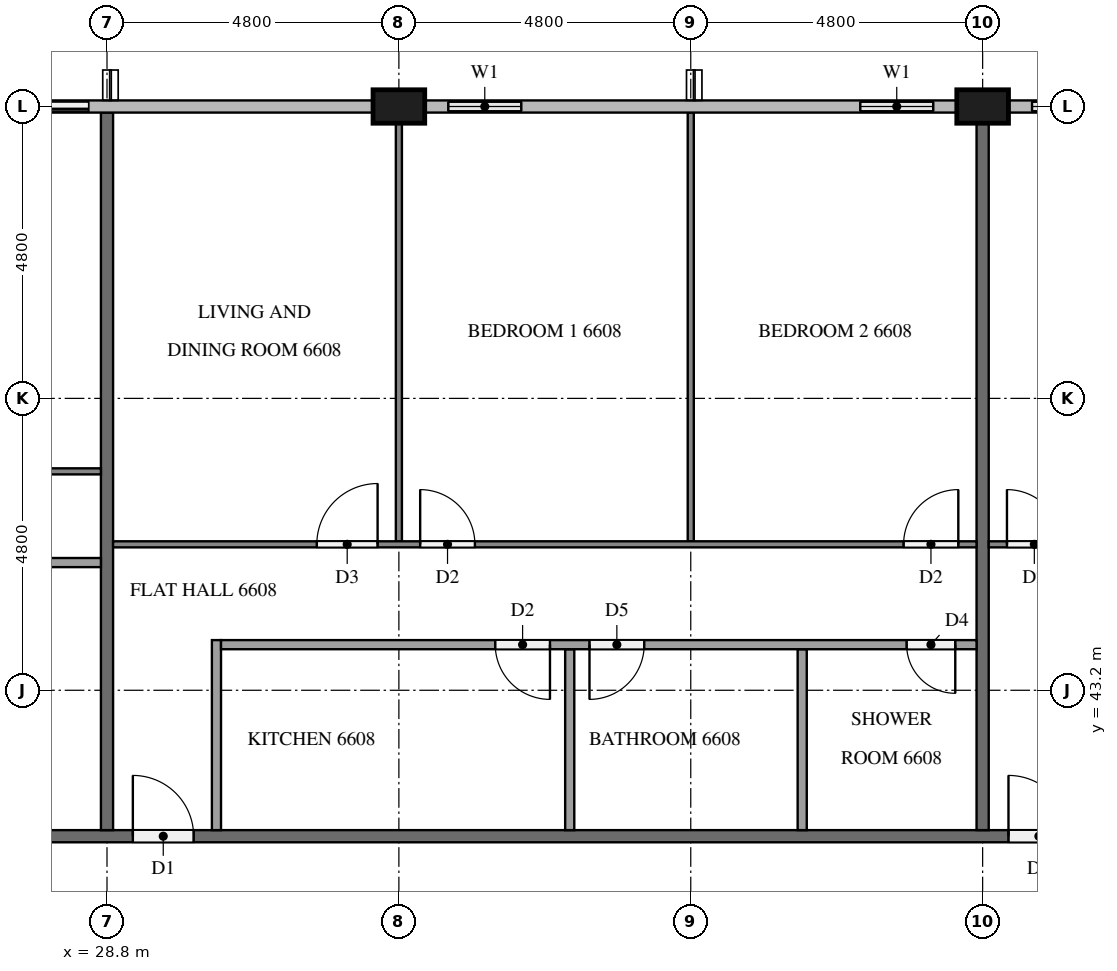
"""IFC4 building model, lengths in metres.
Left out: names, types, materials, properties, quantities, classifications, styles, units other than length and angle.
Written with IfcOpenShell. Run it as: python <this file> out.ifc"""

import sys

from ifc_helpers import new_model, si_unit, direction, frame, frame_2d, origin, origin_2d, place, context, subcontext, project, spatial, rectangle, extrude, element, fill, save


model = new_model("IFC4")
c1 = context("Model", 3, precision=1e-05, world=origin(), true_north=direction((0.0, 1.0)))
c2 = subcontext(c1, "Body", "Model", "MODEL_VIEW")
j1 = project(units=[si_unit("LENGTHUNIT", "METRE"), si_unit("PLANEANGLEUNIT", "RADIAN")], contexts=[c1])
p1 = place(None, origin())
s1 = spatial("IfcSite", under=j1, at=p1, CompositionType="ELEMENT")
p2 = place(p1, origin())
s2 = spatial("IfcBuilding", under=s1, at=p2, CompositionType="ELEMENT")
p3 = place(p2, frame((0.0, 0.0, 252.7)))
s3 = spatial("IfcBuildingStorey", under=s2, at=p3, CompositionType="ELEMENT", Elevation=252.7)
for number, where, z_axis, x_axis in (
    (1, (43.2, 52.8, 0.0), (0.0, 0.0, 1.0), (1.0, 0.0, 0.0)),
    (2, (33.6, 52.8, 0.0), (0.0, 0.0, 1.0), (1.0, 0.0, 0.0)),
):
    element("IfcColumn", number, at=place(p3, frame(where, z_axis=z_axis, x_axis=x_axis)), inside=s3, PredefinedType="COLUMN", context=c2, shape_type="SweptSolid", body=[
        extrude(rectangle(XDim=0.85, YDim=0.55, at=origin_2d()), origin(), (0.0, 0.0, 1.0), 3.2),
    ])
p4 = place(p3, frame((45.6, 52.8, 0.0), z_axis=(0.0, 0.0, 1.0), x_axis=(-1.0, 0.0, 0.0)))
e3 = element("IfcWall", 3, at=p4, inside=s3, PredefinedType="SOLIDWALL", context=c2, shape_type="SweptSolid", body=[
    extrude(rectangle(XDim=1.975, YDim=0.15, at=frame_2d((0.988, 0.0))), origin(), (0.0, 0.0, 1.0), 3.2),
])
p5 = place(p4, frame((0.387, 0.0, 0.9)))
e4 = element("IfcOpeningElement", 4, at=p5, cuts=e3, PredefinedType="OPENING", context=c2, shape_type="SweptSolid", body=[
    extrude(rectangle(XDim=1.2, YDim=1.4, at=frame_2d((0.6, 0.7))), frame((0.0, 0.085, 0.0), z_axis=(0.0, -1.0, 0.0), x_axis=(1.0, 0.0, 0.0)), (0.0, 0.0, 1.0), 0.17),
])
p6 = place(p3, frame((42.775, 52.8, 0.0), z_axis=(0.0, 0.0, 1.0), x_axis=(-1.0, 0.0, 0.0)))
e5 = element("IfcWall", 5, at=p6, inside=s3, PredefinedType="SOLIDWALL", context=c2, shape_type="SweptSolid", body=[
    extrude(rectangle(XDim=1.975, YDim=0.15, at=frame_2d((0.987, 0.0))), origin(), (0.0, 0.0, 1.0), 3.2),
])
p7 = place(p6, frame((0.387, 0.0, 0.9)))
e6 = element("IfcOpeningElement", 6, at=p7, cuts=e5, PredefinedType="OPENING", context=c2, shape_type="SweptSolid", body=[
    extrude(rectangle(XDim=1.2, YDim=1.4, at=frame_2d((0.6, 0.7))), frame((0.0, 0.085, 0.0), z_axis=(0.0, -1.0, 0.0), x_axis=(1.0, 0.0, 0.0)), (0.0, 0.0, 1.0), 0.17),
])
p8 = place(p3, frame((36.0, 52.8, 0.0), z_axis=(0.0, 0.0, 1.0), x_axis=(-1.0, 0.0, 0.0)))
e7 = element("IfcWall", 7, at=p8, inside=s3, PredefinedType="SOLIDWALL", context=c2, shape_type="SweptSolid", body=[
    extrude(rectangle(XDim=1.975, YDim=0.15, at=frame_2d((0.988, 0.0))), origin(), (0.0, 0.0, 1.0), 3.2),
])
p9 = place(p8, frame((0.387, 0.0, 0.9)))
e8 = element("IfcOpeningElement", 8, at=p9, cuts=e7, PredefinedType="OPENING", context=c2, shape_type="SweptSolid", body=[
    extrude(rectangle(XDim=1.2, YDim=1.4, at=frame_2d((0.6, 0.7))), frame((0.0, 0.085, 0.0), z_axis=(0.0, -1.0, 0.0), x_axis=(1.0, 0.0, 0.0)), (0.0, 0.0, 1.0), 0.17),
])
p10 = place(p3, frame((28.8, 52.8, 0.0), z_axis=(0.0, 0.0, 1.0), x_axis=(-1.0, 0.0, 0.0)))
e9 = element("IfcWall", 9, at=p10, inside=s3, PredefinedType="SOLIDWALL", context=c2, shape_type="SweptSolid", body=[
    extrude(rectangle(XDim=2.4, YDim=0.15, at=frame_2d((1.2, 0.0))), origin(), (0.0, 0.0, 1.0), 3.2),
])
p11 = place(p10, frame((0.3, 0.0, 0.0)))
e10 = element("IfcOpeningElement", 10, at=p11, cuts=e9, PredefinedType="OPENING", context=c2, shape_type="SweptSolid", body=[
    extrude(rectangle(XDim=1.8, YDim=2.4, at=frame_2d((0.9, 1.2))), frame((0.0, 0.085, 0.0), z_axis=(0.0, -1.0, 0.0), x_axis=(1.0, 0.0, 0.0)), (0.0, 0.0, 1.0), 0.17),
])
p12 = place(p3, frame((11.9, 40.8, 0.0), z_axis=(0.0, 0.0, 1.0), x_axis=(1.0, 0.0, 0.0)))
e11 = element("IfcWall", 11, at=p12, inside=s3, PredefinedType="PARTITIONING", context=c2, shape_type="SweptSolid", body=[
    extrude(rectangle(XDim=38.6, YDim=0.2, at=frame_2d((19.3, 0.0))), origin(), (0.0, 0.0, 1.0), 3.2),
])
p13 = place(p12, frame((31.725, 0.0, 0.0)))
e12 = element("IfcOpeningElement", 12, at=p13, cuts=e11, PredefinedType="OPENING", context=c2, shape_type="SweptSolid", body=[
    extrude(rectangle(XDim=1.0, YDim=2.1, at=frame_2d((0.5, 1.05))), frame((0.0, 0.11, 0.0), z_axis=(0.0, -1.0, 0.0), x_axis=(1.0, 0.0, 0.0)), (0.0, 0.0, 1.0), 0.22),
])
p14 = place(p12, frame((17.325, 0.0, 0.0)))
e13 = element("IfcOpeningElement", 13, at=p14, cuts=e11, PredefinedType="OPENING", context=c2, shape_type="SweptSolid", body=[
    extrude(rectangle(XDim=1.0, YDim=2.1, at=frame_2d((0.5, 1.05))), frame((0.0, 0.11, 0.0), z_axis=(0.0, -1.0, 0.0), x_axis=(1.0, 0.0, 0.0)), (0.0, 0.0, 1.0), 0.22),
])
p15 = place(p12, frame((0.525, 0.0, 0.0)))
e14 = element("IfcOpeningElement", 14, at=p15, cuts=e11, PredefinedType="OPENING", context=c2, shape_type="SweptSolid", body=[
    extrude(rectangle(XDim=1.0, YDim=2.1, at=frame_2d((0.5, 1.05))), frame((0.0, 0.11, 0.0), z_axis=(0.0, -1.0, 0.0), x_axis=(1.0, 0.0, 0.0)), (0.0, 0.0, 1.0), 0.22),
])
p16 = place(p3, frame((43.2, 52.525, 0.0), z_axis=(0.0, 0.0, 1.0), x_axis=(0.0, -1.0, 0.0)))
e15 = element("IfcWall", 15, at=p16, inside=s3, PredefinedType="PARTITIONING", context=c2, shape_type="SweptSolid", body=[
    extrude(rectangle(XDim=11.625, YDim=0.2, at=frame_2d((5.812, 0.0))), origin(), (0.0, 0.0, 1.0), 3.2),
])
p17 = place(p3, frame((28.8, 52.7, 0.0), z_axis=(0.0, 0.0, 1.0), x_axis=(0.0, -1.0, 0.0)))
e16 = element("IfcWall", 16, at=p17, inside=s3, PredefinedType="PARTITIONING", context=c2, shape_type="SweptSolid", body=[
    extrude(rectangle(XDim=11.8, YDim=0.2, at=frame_2d((5.9, 0.0))), origin(), (0.0, 0.0, 1.0), 3.2),
])
p18 = place(p3, frame((43.3, 45.6, 0.0), z_axis=(0.0, 0.0, 1.0), x_axis=(1.0, 0.0, 0.0)))
e17 = element("IfcWall", 17, at=p18, inside=s3, PredefinedType="PARTITIONING", context=c2, shape_type="SweptSolid", body=[
    extrude(rectangle(XDim=14.2, YDim=0.1, at=frame_2d((7.1, 0.0))), origin(), (0.0, 0.0, 1.0), 3.2),
])
p19 = place(p18, frame((0.3, 0.0, 0.0)))
e18 = element("IfcOpeningElement", 18, at=p19, cuts=e17, PredefinedType="OPENING", context=c2, shape_type="SweptSolid", body=[
    extrude(rectangle(XDim=0.9, YDim=2.1, at=frame_2d((0.45, 1.05))), frame((0.0, 0.06, 0.0), z_axis=(0.0, -1.0, 0.0), x_axis=(1.0, 0.0, 0.0)), (0.0, 0.0, 1.0), 0.12),
])
p20 = place(p18, frame((8.25, 0.0, 0.0)))
e19 = element("IfcOpeningElement", 19, at=p20, cuts=e17, PredefinedType="OPENING", context=c2, shape_type="SweptSolid", body=[
    extrude(rectangle(XDim=0.9, YDim=2.1, at=frame_2d((0.45, 1.05))), frame((0.0, 0.06, 0.0), z_axis=(0.0, -1.0, 0.0), x_axis=(1.0, 0.0, 0.0)), (0.0, 0.0, 1.0), 0.12),
])
p21 = place(p18, frame((9.85, 0.0, 0.0)))
e20 = element("IfcOpeningElement", 20, at=p21, cuts=e17, PredefinedType="OPENING", context=c2, shape_type="SweptSolid", body=[
    extrude(rectangle(XDim=1.0, YDim=2.1, at=frame_2d((0.5, 1.05))), frame((0.0, 0.06, 0.0), z_axis=(0.0, -1.0, 0.0), x_axis=(1.0, 0.0, 0.0)), (0.0, 0.0, 1.0), 0.12),
])
p22 = place(p3, frame((33.6, 45.65, 0.0), z_axis=(0.0, 0.0, 1.0), x_axis=(0.0, 1.0, 0.0)))
e21 = element("IfcWall", 21, at=p22, inside=s3, PredefinedType="PARTITIONING", context=c2, shape_type="SweptSolid", body=[
    extrude(rectangle(XDim=6.875, YDim=0.1, at=frame_2d((3.438, 0.0))), origin(), (0.0, 0.0, 1.0), 3.2),
])
p23 = place(p3, frame((38.4, 45.65, 0.0), z_axis=(0.0, 0.0, 1.0), x_axis=(0.0, 1.0, 0.0)))
e22 = element("IfcWall", 22, at=p23, inside=s3, PredefinedType="PARTITIONING", context=c2, shape_type="SweptSolid", body=[
    extrude(rectangle(XDim=7.05, YDim=0.1, at=frame_2d((3.525, 0.0))), origin(), (0.0, 0.0, 1.0), 3.2),
])
p24 = place(p3, frame((28.9, 45.6, 0.0), z_axis=(0.0, 0.0, 1.0), x_axis=(1.0, 0.0, 0.0)))
e23 = element("IfcWall", 23, at=p24, inside=s3, PredefinedType="PARTITIONING", context=c2, shape_type="SweptSolid", body=[
    extrude(rectangle(XDim=14.2, YDim=0.1, at=frame_2d((7.1, 0.0))), origin(), (0.0, 0.0, 1.0), 3.2),
])
p25 = place(p24, frame((3.35, 0.0, 0.0)))
e24 = element("IfcOpeningElement", 24, at=p25, cuts=e23, PredefinedType="OPENING", context=c2, shape_type="SweptSolid", body=[
    extrude(rectangle(XDim=1.0, YDim=2.1, at=frame_2d((0.5, 1.05))), frame((0.0, 0.06, 0.0), z_axis=(0.0, -1.0, 0.0), x_axis=(1.0, 0.0, 0.0)), (0.0, 0.0, 1.0), 0.12),
])
p26 = place(p24, frame((5.05, 0.0, 0.0)))
e25 = element("IfcOpeningElement", 25, at=p26, cuts=e23, PredefinedType="OPENING", context=c2, shape_type="SweptSolid", body=[
    extrude(rectangle(XDim=0.9, YDim=2.1, at=frame_2d((0.45, 1.05))), frame((0.0, 0.06, 0.0), z_axis=(0.0, -1.0, 0.0), x_axis=(1.0, 0.0, 0.0)), (0.0, 0.0, 1.0), 0.12),
])
p27 = place(p24, frame((13.0, 0.0, 0.0)))
e26 = element("IfcOpeningElement", 26, at=p27, cuts=e23, PredefinedType="OPENING", context=c2, shape_type="SweptSolid", body=[
    extrude(rectangle(XDim=0.9, YDim=2.1, at=frame_2d((0.45, 1.05))), frame((0.0, 0.06, 0.0), z_axis=(0.0, -1.0, 0.0), x_axis=(1.0, 0.0, 0.0)), (0.0, 0.0, 1.0), 0.12),
])
for number, where, z_axis, x_axis in (
    (27, (36.41, 40.9, 0.0), (0.0, 0.0, 1.0), (0.0, 1.0, 0.0)),
    (28, (40.233, 40.9, 0.0), (0.0, 0.0, 1.0), (0.0, 1.0, 0.0)),
):
    element("IfcWall", number, at=place(p3, frame(where, z_axis=z_axis, x_axis=x_axis)), inside=s3, PredefinedType="PARTITIONING", context=c2, shape_type="SweptSolid", body=[
        extrude(rectangle(XDim=2.975, YDim=0.15, at=frame_2d((1.488, 0.0))), origin(), (0.0, 0.0, 1.0), 3.2),
    ])
p28 = place(p3, frame((30.6, 40.9, 0.0), z_axis=(0.0, 0.0, 1.0), x_axis=(0.0, 1.0, 0.0)))
e29 = element("IfcWall", 29, at=p28, inside=s3, PredefinedType="PARTITIONING", context=c2, shape_type="SweptSolid", body=[
    extrude(rectangle(XDim=3.125, YDim=0.15, at=frame_2d((1.562, 0.0))), origin(), (0.0, 0.0, 1.0), 3.2),
])
p29 = place(p3, frame((43.1, 43.95, 0.0), z_axis=(0.0, 0.0, 1.0), x_axis=(-1.0, 0.0, 0.0)))
e30 = element("IfcWall", 30, at=p29, inside=s3, PredefinedType="PARTITIONING", context=c2, shape_type="SweptSolid", body=[
    extrude(rectangle(XDim=12.425, YDim=0.15, at=frame_2d((6.212, 0.0))), origin(), (0.0, 0.0, 1.0), 3.2),
])
p30 = place(p29, frame((7.015, 0.0, 0.0)))
e31 = element("IfcOpeningElement", 31, at=p30, cuts=e30, PredefinedType="OPENING", context=c2, shape_type="SweptSolid", body=[
    extrude(rectangle(XDim=0.9, YDim=2.1, at=frame_2d((0.45, 1.05))), frame((0.0, 0.085, 0.0), z_axis=(0.0, -1.0, 0.0), x_axis=(1.0, 0.0, 0.0)), (0.0, 0.0, 1.0), 0.17),
])
p31 = place(p29, frame((5.465, 0.0, 0.0)))
e32 = element("IfcOpeningElement", 32, at=p31, cuts=e30, PredefinedType="OPENING", context=c2, shape_type="SweptSolid", body=[
    extrude(rectangle(XDim=0.9, YDim=2.1, at=frame_2d((0.45, 1.05))), frame((0.0, 0.085, 0.0), z_axis=(0.0, -1.0, 0.0), x_axis=(1.0, 0.0, 0.0)), (0.0, 0.0, 1.0), 0.17),
])
p32 = place(p29, frame((0.35, 0.0, 0.0)))
e33 = element("IfcOpeningElement", 33, at=p32, cuts=e30, PredefinedType="OPENING", context=c2, shape_type="SweptSolid", body=[
    extrude(rectangle(XDim=0.8, YDim=2.1, at=frame_2d((0.4, 1.05))), frame((0.0, 0.085, 0.0), z_axis=(0.0, -1.0, 0.0), x_axis=(1.0, 0.0, 0.0)), (0.0, 0.0, 1.0), 0.17),
])
p33 = place(p3, frame((12.1, 46.8, 0.0), z_axis=(0.0, 0.0, 1.0), x_axis=(1.0, 0.0, 0.0)))
e34 = element("IfcWall", 34, at=p33, inside=s3, PredefinedType="PARTITIONING", context=c2, shape_type="SweptSolid", body=[
    extrude(rectangle(XDim=16.6, YDim=0.1, at=frame_2d((8.3, 0.0))), origin(), (0.0, 0.0, 1.0), 3.2),
])
p34 = place(p33, frame((0.3, 0.0, 0.0)))
e35 = element("IfcOpeningElement", 35, at=p34, cuts=e34, PredefinedType="OPENING", context=c2, shape_type="SweptSolid", body=[
    extrude(rectangle(XDim=0.9, YDim=2.1, at=frame_2d((0.45, 1.05))), frame((0.0, 0.06, 0.0), z_axis=(0.0, -1.0, 0.0), x_axis=(1.0, 0.0, 0.0)), (0.0, 0.0, 1.0), 0.12),
])
p35 = place(p33, frame((8.25, 0.0, 0.0)))
e36 = element("IfcOpeningElement", 36, at=p35, cuts=e34, PredefinedType="OPENING", context=c2, shape_type="SweptSolid", body=[
    extrude(rectangle(XDim=0.9, YDim=2.1, at=frame_2d((0.45, 1.05))), frame((0.0, 0.06, 0.0), z_axis=(0.0, -1.0, 0.0), x_axis=(1.0, 0.0, 0.0)), (0.0, 0.0, 1.0), 0.12),
])
p36 = place(p33, frame((9.85, 0.0, 0.0)))
e37 = element("IfcOpeningElement", 37, at=p36, cuts=e34, PredefinedType="OPENING", context=c2, shape_type="SweptSolid", body=[
    extrude(rectangle(XDim=1.0, YDim=2.1, at=frame_2d((0.5, 1.05))), frame((0.0, 0.06, 0.0), z_axis=(0.0, -1.0, 0.0), x_axis=(1.0, 0.0, 0.0)), (0.0, 0.0, 1.0), 0.12),
])
p37 = place(p3, frame((28.7, 45.3, 0.0), z_axis=(0.0, 0.0, 1.0), x_axis=(-1.0, 0.0, 0.0)))
e38 = element("IfcWall", 38, at=p37, inside=s3, PredefinedType="PARTITIONING", context=c2, shape_type="SweptSolid", body=[
    extrude(rectangle(XDim=14.825, YDim=0.15, at=frame_2d((7.413, 0.0))), origin(), (0.0, 0.0, 1.0), 3.2),
])
p38 = place(p37, frame((13.625, 0.0, 0.0)))
e39 = element("IfcOpeningElement", 39, at=p38, cuts=e38, PredefinedType="OPENING", context=c2, shape_type="SweptSolid", body=[
    extrude(rectangle(XDim=0.9, YDim=2.1, at=frame_2d((0.45, 1.05))), frame((0.0, 0.085, 0.0), z_axis=(0.0, -1.0, 0.0), x_axis=(1.0, 0.0, 0.0)), (0.0, 0.0, 1.0), 0.17),
])
p39 = place(p37, frame((4.886, 0.0, 0.0)))
e40 = element("IfcOpeningElement", 40, at=p39, cuts=e38, PredefinedType="OPENING", context=c2, shape_type="SweptSolid", body=[
    extrude(rectangle(XDim=0.8, YDim=2.1, at=frame_2d((0.4, 1.05))), frame((0.0, 0.085, 0.0), z_axis=(0.0, -1.0, 0.0), x_axis=(1.0, 0.0, 0.0)), (0.0, 0.0, 1.0), 0.17),
])
p40 = place(p37, frame((3.336, 0.0, 0.0)))
e41 = element("IfcOpeningElement", 41, at=p40, cuts=e38, PredefinedType="OPENING", context=c2, shape_type="SweptSolid", body=[
    extrude(rectangle(XDim=0.9, YDim=2.1, at=frame_2d((0.45, 1.05))), frame((0.0, 0.085, 0.0), z_axis=(0.0, -1.0, 0.0), x_axis=(1.0, 0.0, 0.0)), (0.0, 0.0, 1.0), 0.17),
])
p41 = place(p5, origin())
e42 = element("IfcWindow", 42, at=p41, inside=s3, PartitioningType="SINGLE_PANEL", PredefinedType="WINDOW", context=c2, shape_type="SweptSolid", body=[
    extrude(rectangle(XDim=1.2, YDim=1.4, at=frame_2d((0.6, 0.7))), frame((0.0, 0.03, 0.0), z_axis=(0.0, -1.0, 0.0), x_axis=(1.0, 0.0, 0.0)), (0.0, 0.0, 1.0), 0.06),
])
fill(e4, e42)
p42 = place(p7, origin())
e43 = element("IfcWindow", 43, at=p42, inside=s3, PartitioningType="SINGLE_PANEL", PredefinedType="WINDOW", context=c2, shape_type="SweptSolid", body=[
    extrude(rectangle(XDim=1.2, YDim=1.4, at=frame_2d((0.6, 0.7))), frame((0.0, 0.03, 0.0), z_axis=(0.0, -1.0, 0.0), x_axis=(1.0, 0.0, 0.0)), (0.0, 0.0, 1.0), 0.06),
])
fill(e6, e43)
p43 = place(p9, origin())
e44 = element("IfcWindow", 44, at=p43, inside=s3, PartitioningType="SINGLE_PANEL", PredefinedType="WINDOW", context=c2, shape_type="SweptSolid", body=[
    extrude(rectangle(XDim=1.2, YDim=1.4, at=frame_2d((0.6, 0.7))), frame((0.0, 0.03, 0.0), z_axis=(0.0, -1.0, 0.0), x_axis=(1.0, 0.0, 0.0)), (0.0, 0.0, 1.0), 0.06),
])
fill(e8, e44)
p44 = place(p11, origin())
e45 = element("IfcDoor", 45, at=p44, inside=s3, OperationType="SLIDING_TO_LEFT", PredefinedType="DOOR", context=c2, shape_type="SweptSolid", body=[
    extrude(rectangle(XDim=1.8, YDim=2.4, at=frame_2d((0.9, 1.2))), frame((0.0, 0.025, 0.0), z_axis=(0.0, -1.0, 0.0), x_axis=(1.0, 0.0, 0.0)), (0.0, 0.0, 1.0), 0.05),
])
fill(e10, e45)
p45 = place(p13, origin())
e46 = element("IfcDoor", 46, at=p45, inside=s3, OperationType="SINGLE_SWING_LEFT", PredefinedType="DOOR", context=c2, shape_type="SweptSolid", body=[
    extrude(rectangle(XDim=1.0, YDim=2.1, at=frame_2d((0.5, 1.05))), frame((0.0, 0.025, 0.0), z_axis=(0.0, -1.0, 0.0), x_axis=(1.0, 0.0, 0.0)), (0.0, 0.0, 1.0), 0.05),
])
fill(e12, e46)
p46 = place(p14, origin())
e47 = element("IfcDoor", 47, at=p46, inside=s3, OperationType="SINGLE_SWING_LEFT", PredefinedType="DOOR", context=c2, shape_type="SweptSolid", body=[
    extrude(rectangle(XDim=1.0, YDim=2.1, at=frame_2d((0.5, 1.05))), frame((0.0, 0.025, 0.0), z_axis=(0.0, -1.0, 0.0), x_axis=(1.0, 0.0, 0.0)), (0.0, 0.0, 1.0), 0.05),
])
fill(e13, e47)
p47 = place(p19, origin())
e48 = element("IfcDoor", 48, at=p47, inside=s3, OperationType="SINGLE_SWING_LEFT", PredefinedType="DOOR", context=c2, shape_type="SweptSolid", body=[
    extrude(rectangle(XDim=0.9, YDim=2.1, at=frame_2d((0.45, 1.05))), frame((0.0, 0.025, 0.0), z_axis=(0.0, -1.0, 0.0), x_axis=(1.0, 0.0, 0.0)), (0.0, 0.0, 1.0), 0.05),
])
fill(e18, e48)
p48 = place(p25, origin())
e49 = element("IfcDoor", 49, at=p48, inside=s3, OperationType="SINGLE_SWING_RIGHT", PredefinedType="DOOR", context=c2, shape_type="SweptSolid", body=[
    extrude(rectangle(XDim=1.0, YDim=2.1, at=frame_2d((0.5, 1.05))), frame((0.0, 0.025, 0.0), z_axis=(0.0, -1.0, 0.0), x_axis=(1.0, 0.0, 0.0)), (0.0, 0.0, 1.0), 0.05),
])
fill(e24, e49)
p49 = place(p26, origin())
e50 = element("IfcDoor", 50, at=p49, inside=s3, OperationType="SINGLE_SWING_LEFT", PredefinedType="DOOR", context=c2, shape_type="SweptSolid", body=[
    extrude(rectangle(XDim=0.9, YDim=2.1, at=frame_2d((0.45, 1.05))), frame((0.0, 0.025, 0.0), z_axis=(0.0, -1.0, 0.0), x_axis=(1.0, 0.0, 0.0)), (0.0, 0.0, 1.0), 0.05),
])
fill(e25, e50)
p50 = place(p27, origin())
e51 = element("IfcDoor", 51, at=p50, inside=s3, OperationType="SINGLE_SWING_RIGHT", PredefinedType="DOOR", context=c2, shape_type="SweptSolid", body=[
    extrude(rectangle(XDim=0.9, YDim=2.1, at=frame_2d((0.45, 1.05))), frame((0.0, 0.025, 0.0), z_axis=(0.0, -1.0, 0.0), x_axis=(1.0, 0.0, 0.0)), (0.0, 0.0, 1.0), 0.05),
])
fill(e26, e51)
p51 = place(p30, origin())
e52 = element("IfcDoor", 52, at=p51, inside=s3, OperationType="SINGLE_SWING_LEFT", PredefinedType="DOOR", context=c2, shape_type="SweptSolid", body=[
    extrude(rectangle(XDim=0.9, YDim=2.1, at=frame_2d((0.45, 1.05))), frame((0.0, 0.025, 0.0), z_axis=(0.0, -1.0, 0.0), x_axis=(1.0, 0.0, 0.0)), (0.0, 0.0, 1.0), 0.05),
])
fill(e31, e52)
p52 = place(p31, origin())
e53 = element("IfcDoor", 53, at=p52, inside=s3, OperationType="SINGLE_SWING_RIGHT", PredefinedType="DOOR", context=c2, shape_type="SweptSolid", body=[
    extrude(rectangle(XDim=0.9, YDim=2.1, at=frame_2d((0.45, 1.05))), frame((0.0, 0.025, 0.0), z_axis=(0.0, -1.0, 0.0), x_axis=(1.0, 0.0, 0.0)), (0.0, 0.0, 1.0), 0.05),
])
fill(e32, e53)
p53 = place(p32, origin())
e54 = element("IfcDoor", 54, at=p53, inside=s3, OperationType="SINGLE_SWING_LEFT", PredefinedType="DOOR", context=c2, shape_type="SweptSolid", body=[
    extrude(rectangle(XDim=0.8, YDim=2.1, at=frame_2d((0.4, 1.05))), frame((0.0, 0.025, 0.0), z_axis=(0.0, -1.0, 0.0), x_axis=(1.0, 0.0, 0.0)), (0.0, 0.0, 1.0), 0.05),
])
fill(e33, e54)
save(model, sys.argv[1])
